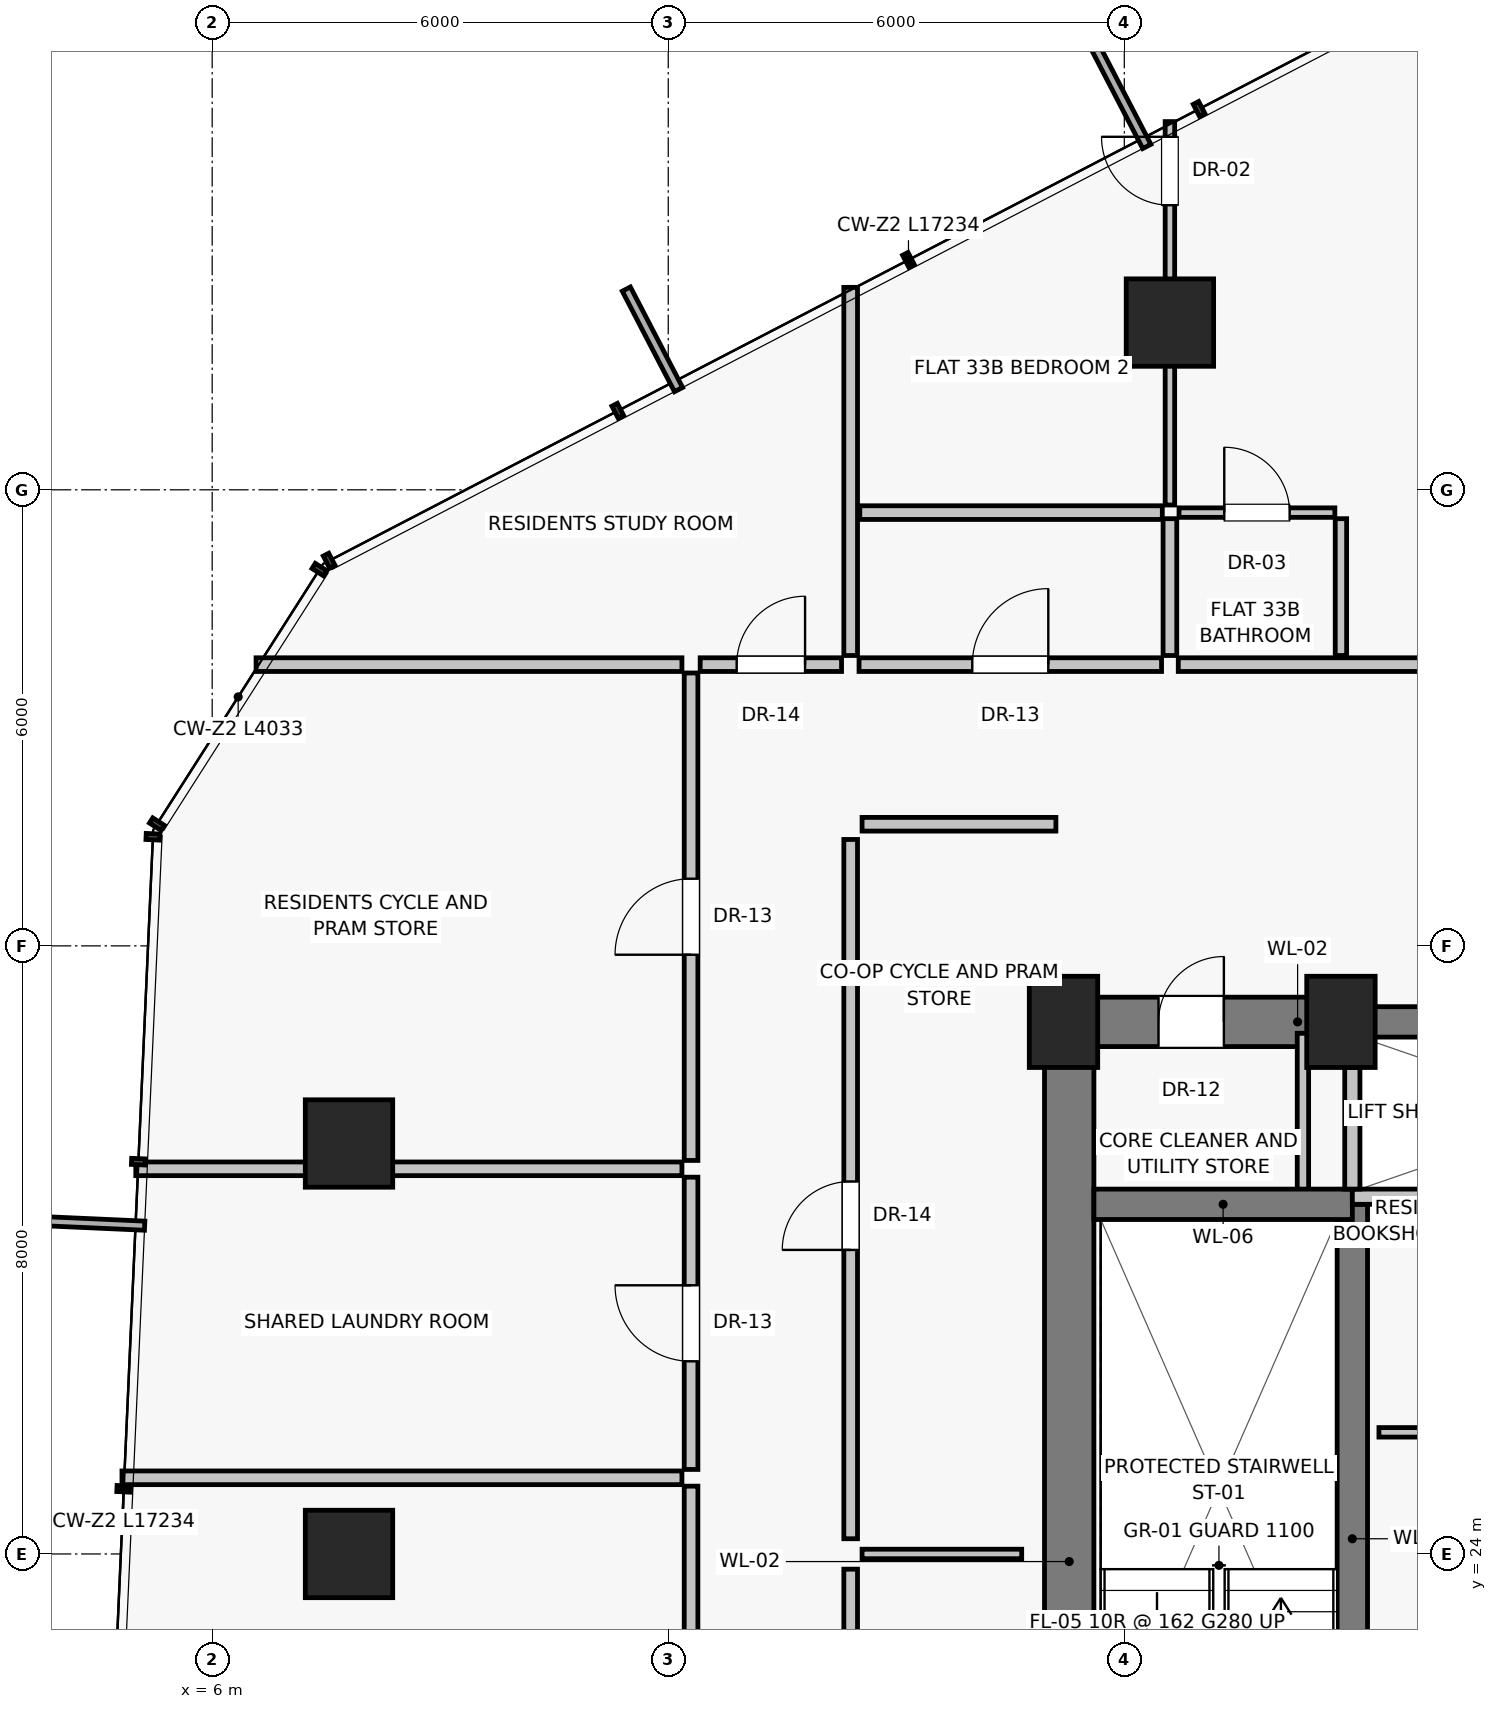
"""IFC4 building model, lengths in metres.
Left out: names, types, materials, properties, quantities, classifications, styles, units other than length and angle.
Written with IfcOpenShell. Run it as: python <this file> out.ifc"""

import sys

from ifc_helpers import new_model, si_unit, direction, frame, frame_2d, origin, origin_2d, place, context, subcontext, project, spatial, rectangle, extrude, source, transform, mapped, element, fill, save


model = new_model("IFC4")
c1 = context("Model", 3, precision=1e-05, world=origin(), true_north=direction((0.0, 1.0)))
c2 = subcontext(c1, "Body", "Model", "MODEL_VIEW")
j1 = project(units=[si_unit("LENGTHUNIT", "METRE"), si_unit("PLANEANGLEUNIT", "RADIAN")], contexts=[c1])
p1 = place(None, origin())
s1 = spatial("IfcSite", under=j1, at=p1, CompositionType="ELEMENT")
p2 = place(p1, origin())
s2 = spatial("IfcBuilding", under=s1, at=p2, CompositionType="ELEMENT")
p3 = place(p2, frame((0.0, 0.0, 119.75)))
s3 = spatial("IfcBuildingStorey", under=s2, at=p3, CompositionType="ELEMENT", Elevation=119.75)
for number, where, z_axis, x_axis in (
    (1, (17.2, 31.0, 0.0), (0.0, 0.0, 1.0), (1.0, 0.0, 0.0)),
    (2, (20.85, 31.0, 0.0), (0.0, 0.0, 1.0), (1.0, 0.0, 0.0)),
):
    element("IfcColumn", number, at=place(p3, frame(where, z_axis=z_axis, x_axis=x_axis)), inside=s3, PredefinedType="PILASTER", context=c2, shape_type="SweptSolid", body=[
        extrude(rectangle(XDim=0.9, YDim=1.2, at=origin_2d()), origin(), (0.0, 0.0, 1.0), 3.25),
    ])
for number, where, z_axis, x_axis in (
    (3, (18.6, 40.2, 0.0), (0.0, 0.0, 1.0), (1.0, 0.0, 0.0)),
    (4, (7.8, 29.4, 0.0), (0.0, 0.0, 1.0), (1.0, 0.0, 0.0)),
    (5, (7.8, 24.0, 0.0), (0.0, 0.0, 1.0), (1.0, 0.0, 0.0)),
):
    element("IfcColumn", number, at=place(p3, frame(where, z_axis=z_axis, x_axis=x_axis)), inside=s3, PredefinedType="COLUMN", context=c2, shape_type="SweptSolid", body=[
        extrude(rectangle(XDim=1.15, YDim=1.15, at=origin_2d()), origin(), (0.0, 0.0, 1.0), 3.25),
    ])
p4 = place(p3, frame((17.275, 16.8, 0.0), z_axis=(0.0, 0.0, 1.0), x_axis=(0.0, 1.0, 0.0)))
e6 = element("IfcWall", 6, at=p4, inside=s3, PredefinedType="SHEAR", context=c2, shape_type="SweptSolid", body=[
    extrude(rectangle(XDim=14.2, YDim=0.65, at=frame_2d((7.1, 0.0))), origin(), (0.0, 0.0, 1.0), 3.0),
])
p5 = place(p3, frame((17.2, 31.0, 0.0), z_axis=(0.0, 0.0, 1.0), x_axis=(1.0, 0.0, 0.0)))
e7 = element("IfcWall", 7, at=p5, inside=s3, PredefinedType="SHEAR", context=c2, shape_type="SweptSolid", body=[
    extrude(rectangle(XDim=3.8, YDim=0.65, at=frame_2d((1.9, 0.0))), origin(), (0.0, 0.0, 1.0), 3.0),
])
p6 = place(p5, frame((1.25, 0.0, 0.0)))
e8 = element("IfcOpeningElement", 8, at=p6, cuts=e7, PredefinedType="OPENING", context=c2, shape_type="SweptSolid", body=[
    extrude(rectangle(XDim=0.86, YDim=2.01, at=frame_2d((0.43, 1.005))), frame((0.0, 0.335, 0.0), z_axis=(0.0, -1.0, 0.0), x_axis=(1.0, 0.0, 0.0)), (0.0, 0.0, 1.0), 0.67),
])
p7 = place(p3, frame((21.0, 31.0, 0.0), z_axis=(0.0, 0.0, 1.0), x_axis=(1.0, 0.0, 0.0)))
e9 = element("IfcWall", 9, at=p7, inside=s3, PredefinedType="SHEAR", context=c2, shape_type="SweptSolid", body=[
    extrude(rectangle(XDim=6.0, YDim=0.4, at=frame_2d((3.0, 0.0))), origin(), (0.0, 0.0, 1.0), 3.0),
])
p8 = place(p3, frame((20.35, 28.65, 0.0), z_axis=(0.0, 0.0, 1.0), x_axis=(0.0, 1.0, 0.0)))
e10 = element("IfcWall", 10, at=p8, inside=s3, PredefinedType="PARTITIONING", context=c2, shape_type="SweptSolid", body=[
    extrude(rectangle(XDim=2.2, YDim=0.15, at=frame_2d((1.1, 0.0))), origin(), (0.0, 0.0, 1.0), 3.0),
])
p9 = place(p3, frame((21.0, 19.8, 0.0), z_axis=(0.0, 0.0, 1.0), x_axis=(0.0, 1.0, 0.0)))
e11 = element("IfcWall", 11, at=p9, inside=s3, PredefinedType="SHEAR", context=c2, shape_type="SweptSolid", body=[
    extrude(rectangle(XDim=8.8, YDim=0.4, at=frame_2d((4.4, 0.0))), origin(), (0.0, 0.0, 1.0), 3.0),
])
p10 = place(p3, frame((17.6, 28.6, 0.0), z_axis=(0.0, 0.0, 1.0), x_axis=(1.0, 0.0, 0.0)))
e12 = element("IfcWall", 12, at=p10, inside=s3, PredefinedType="SHEAR", context=c2, shape_type="SweptSolid", body=[
    extrude(rectangle(XDim=3.4, YDim=0.4, at=frame_2d((1.7, 0.0))), origin(), (0.0, 0.0, 1.0), 3.0),
])
p11 = place(p3, frame((21.0, 28.7, 0.0), z_axis=(0.0, 0.0, 1.0), x_axis=(1.0, 0.0, 0.0)))
e13 = element("IfcWall", 13, at=p11, inside=s3, PredefinedType="SOLIDWALL", context=c2, shape_type="SweptSolid", body=[
    extrude(rectangle(XDim=6.0, YDim=0.2, at=frame_2d((3.0, 0.0))), origin(), (0.0, 0.0, 1.0), 3.0),
])
p12 = place(p3, frame((21.0, 28.8, 0.0), z_axis=(0.0, 0.0, 1.0), x_axis=(0.0, 1.0, 0.0)))
e14 = element("IfcWall", 14, at=p12, inside=s3, PredefinedType="SOLIDWALL", context=c2, shape_type="SweptSolid", body=[
    extrude(rectangle(XDim=1.6, YDim=0.2, at=frame_2d((0.8, 0.0))), origin(), (0.0, 0.0, 1.0), 3.0),
])
p13 = place(p3, frame((21.35, 25.6, 0.0), z_axis=(0.0, 0.0, 1.0), x_axis=(1.0, 0.0, 0.0)))
e15 = element("IfcWall", 15, at=p13, inside=s3, PredefinedType="PARTITIONING", context=c2, shape_type="SweptSolid", body=[
    extrude(rectangle(XDim=2.4, YDim=0.125, at=frame_2d((1.2, 0.0))), origin(), (0.0, 0.0, 1.0), 3.0),
])
p14 = place(p3, frame((14.4, 14.4, 0.0), z_axis=(0.0, 0.0, 1.0), x_axis=(0.0, 1.0, 0.0)))
e16 = element("IfcWall", 16, at=p14, inside=s3, PredefinedType="PARTITIONING", context=c2, shape_type="SweptSolid", body=[
    extrude(rectangle(XDim=9.4, YDim=0.18, at=frame_2d((4.7, 0.0))), origin(), (0.0, 0.0, 1.0), 3.0),
])
p15 = place(p14, frame((3.8, 0.0, 0.0)))
e17 = element("IfcOpeningElement", 17, at=p15, cuts=e16, PredefinedType="OPENING", context=c2, shape_type="SweptSolid", body=[
    extrude(rectangle(XDim=0.9, YDim=2.01, at=frame_2d((0.45, 1.005))), frame((0.0, 0.1, 0.0), z_axis=(0.0, -1.0, 0.0), x_axis=(1.0, 0.0, 0.0)), (0.0, 0.0, 1.0), 0.2),
])
p16 = place(p3, frame((14.4, 24.2, 0.0), z_axis=(0.0, 0.0, 1.0), x_axis=(0.0, 1.0, 0.0)))
e18 = element("IfcWall", 18, at=p16, inside=s3, PredefinedType="PARTITIONING", context=c2, shape_type="SweptSolid", body=[
    extrude(rectangle(XDim=9.2, YDim=0.18, at=frame_2d((4.6, 0.0))), origin(), (0.0, 0.0, 1.0), 3.0),
])
p17 = place(p16, frame((3.8, 0.0, 0.0)))
e19 = element("IfcOpeningElement", 19, at=p17, cuts=e18, PredefinedType="OPENING", context=c2, shape_type="SweptSolid", body=[
    extrude(rectangle(XDim=0.9, YDim=2.01, at=frame_2d((0.45, 1.005))), frame((0.0, 0.1, 0.0), z_axis=(0.0, -1.0, 0.0), x_axis=(1.0, 0.0, 0.0)), (0.0, 0.0, 1.0), 0.2),
])
p18 = place(p3, frame((14.55, 24.0, 0.0), z_axis=(0.0, 0.0, 1.0), x_axis=(1.0, 0.0, 0.0)))
e20 = element("IfcWall", 20, at=p18, inside=s3, PredefinedType="PARTITIONING", context=c2, shape_type="SweptSolid", body=[
    extrude(rectangle(XDim=2.1, YDim=0.125, at=frame_2d((1.05, 0.0))), origin(), (0.0, 0.0, 1.0), 3.0),
])
p19 = place(p3, frame((14.55, 33.6, 0.0), z_axis=(0.0, 0.0, 1.0), x_axis=(1.0, 0.0, 0.0)))
e21 = element("IfcWall", 21, at=p19, inside=s3, PredefinedType="PARTITIONING", context=c2, shape_type="SweptSolid", body=[
    extrude(rectangle(XDim=2.55, YDim=0.18, at=frame_2d((1.275, 0.0))), origin(), (0.0, 0.0, 1.0), 3.0),
])
p20 = place(p3, frame((14.4, 35.82, 0.0), z_axis=(0.0, 0.0, 1.0), x_axis=(0.0, 1.0, 0.0)))
e22 = element("IfcWall", 22, at=p20, inside=s3, PredefinedType="PARTITIONING", context=c2, shape_type="SweptSolid", body=[
    extrude(rectangle(XDim=4.843, YDim=0.18, at=frame_2d((2.422, 0.0))), origin(), (0.0, 0.0, 1.0), 3.0),
])
p21 = place(p3, frame((14.51, 35.7, 0.0), z_axis=(0.0, 0.0, 1.0), x_axis=(1.0, 0.0, 0.0)))
e23 = element("IfcWall", 23, at=p21, inside=s3, PredefinedType="PARTITIONING", context=c2, shape_type="SweptSolid", body=[
    extrude(rectangle(XDim=3.98, YDim=0.18, at=frame_2d((1.99, 0.0))), origin(), (0.0, 0.0, 1.0), 2.58),
])
p22 = place(p21, frame((1.49, 0.0, 0.0)))
e24 = element("IfcOpeningElement", 24, at=p22, cuts=e23, PredefinedType="OPENING", context=c2, shape_type="SweptSolid", body=[
    extrude(rectangle(XDim=1.0, YDim=2.01, at=frame_2d((0.5, 1.005))), frame((0.0, 0.1, 0.0), z_axis=(0.0, -1.0, 0.0), x_axis=(1.0, 0.0, 0.0)), (0.0, 0.0, 1.0), 0.2),
])
p23 = place(p3, frame((18.71, 35.7, 0.0), z_axis=(0.0, 0.0, 1.0), x_axis=(1.0, 0.0, 0.0)))
e25 = element("IfcWall", 25, at=p23, inside=s3, PredefinedType="PARTITIONING", context=c2, shape_type="SweptSolid", body=[
    extrude(rectangle(XDim=14.78, YDim=0.18, at=frame_2d((7.39, 0.0))), origin(), (0.0, 0.0, 1.0), 2.58),
])
p24 = place(p23, frame((5.94, 0.0, 0.0)))
e26 = element("IfcOpeningElement", 26, at=p24, cuts=e25, PredefinedType="OPENING", context=c2, shape_type="SweptSolid", body=[
    extrude(rectangle(XDim=0.95, YDim=2.02, at=frame_2d((0.475, 1.01))), frame((0.0, 0.1, 0.0), z_axis=(0.0, -1.0, 0.0), x_axis=(1.0, 0.0, 0.0)), (0.0, 0.0, 1.0), 0.2),
])
p25 = place(p3, frame((14.52, 37.7, 0.0), z_axis=(0.0, 0.0, 1.0), x_axis=(1.0, 0.0, 0.0)))
e27 = element("IfcWall", 27, at=p25, inside=s3, PredefinedType="PARTITIONING", context=c2, shape_type="SweptSolid", body=[
    extrude(rectangle(XDim=3.98, YDim=0.18, at=frame_2d((1.99, 0.0))), origin(), (0.0, 0.0, 1.0), 3.0),
])
p26 = place(p3, frame((18.6, 35.82, 0.0), z_axis=(0.0, 0.0, 1.0), x_axis=(0.0, 1.0, 0.0)))
e28 = element("IfcWall", 28, at=p26, inside=s3, PredefinedType="PARTITIONING", context=c2, shape_type="SweptSolid", body=[
    extrude(rectangle(XDim=1.8, YDim=0.18, at=frame_2d((0.9, 0.0))), origin(), (0.0, 0.0, 1.0), 2.378),
])
p27 = place(p3, frame((18.6, 37.8, 0.0), z_axis=(0.0, 0.0, 1.0), x_axis=(0.0, 1.0, 0.0)))
e29 = element("IfcWall", 29, at=p27, inside=s3, PredefinedType="PARTITIONING", context=c2, shape_type="SweptSolid", body=[
    extrude(rectangle(XDim=5.044, YDim=0.125, at=frame_2d((2.522, 0.0))), origin(), (0.0, 0.0, 1.0), 2.378),
])
p28 = place(p27, frame((3.944, 0.0, 0.0)))
e30 = element("IfcOpeningElement", 30, at=p28, cuts=e29, PredefinedType="OPENING", context=c2, shape_type="SweptSolid", body=[
    extrude(rectangle(XDim=0.9, YDim=2.01, at=frame_2d((0.45, 1.005))), frame((0.0, 0.073, 0.0), z_axis=(0.0, -1.0, 0.0), x_axis=(1.0, 0.0, 0.0)), (0.0, 0.0, 1.0), 0.145),
])
p29 = place(p3, frame((20.85, 35.82, 0.0), z_axis=(0.0, 0.0, 1.0), x_axis=(0.0, 1.0, 0.0)))
e31 = element("IfcWall", 31, at=p29, inside=s3, PredefinedType="PARTITIONING", context=c2, shape_type="SweptSolid", body=[
    extrude(rectangle(XDim=1.8, YDim=0.15, at=frame_2d((0.9, 0.0))), origin(), (0.0, 0.0, 1.0), 3.0),
])
p30 = place(p3, frame((18.72, 37.7, 0.0), z_axis=(0.0, 0.0, 1.0), x_axis=(1.0, 0.0, 0.0)))
e32 = element("IfcWall", 32, at=p30, inside=s3, PredefinedType="PARTITIONING", context=c2, shape_type="SweptSolid", body=[
    extrude(rectangle(XDim=2.05, YDim=0.125, at=frame_2d((1.025, 0.0))), origin(), (0.0, 0.0, 1.0), 3.0),
])
p31 = place(p30, frame((0.595, 0.0, 0.0)))
e33 = element("IfcOpeningElement", 33, at=p31, cuts=e32, PredefinedType="OPENING", context=c2, shape_type="SweptSolid", body=[
    extrude(rectangle(XDim=0.86, YDim=2.01, at=frame_2d((0.43, 1.005))), frame((0.0, 0.073, 0.0), z_axis=(0.0, -1.0, 0.0), x_axis=(1.0, 0.0, 0.0)), (0.0, 0.0, 1.0), 0.145),
])
p32 = place(p3, frame((12.18, 35.7, 0.0), z_axis=(0.0, 0.0, 1.0), x_axis=(-1.0, 0.0, 0.0)))
e34 = element("IfcWall", 34, at=p32, inside=s3, PredefinedType="PARTITIONING", context=c2, shape_type="SweptSolid", body=[
    extrude(rectangle(XDim=5.603, YDim=0.18, at=frame_2d((2.801, 0.0))), origin(), (0.0, 0.0, 1.0), 3.0),
])
p33 = place(p3, frame((12.3, 17.113, 0.0), z_axis=(0.0, 0.0, 1.0), x_axis=(0.0, 1.0, 0.0)))
e35 = element("IfcWall", 35, at=p33, inside=s3, PredefinedType="PARTITIONING", context=c2, shape_type="SweptSolid", body=[
    extrude(rectangle(XDim=7.779, YDim=0.18, at=frame_2d((3.89, 0.0))), origin(), (0.0, 0.0, 1.0), 2.58),
])
p34 = place(p33, frame((3.389, 0.0, 0.0)))
e36 = element("IfcOpeningElement", 36, at=p34, cuts=e35, PredefinedType="OPENING", context=c2, shape_type="SweptSolid", body=[
    extrude(rectangle(XDim=1.0, YDim=2.01, at=frame_2d((0.5, 1.005))), frame((0.0, 0.1, 0.0), z_axis=(0.0, -1.0, 0.0), x_axis=(1.0, 0.0, 0.0)), (0.0, 0.0, 1.0), 0.2),
])
p35 = place(p3, frame((12.18, 25.002, 0.0), z_axis=(0.0, 0.0, 1.0), x_axis=(-1.0, 0.0, 0.0)))
e37 = element("IfcWall", 37, at=p35, inside=s3, PredefinedType="PARTITIONING", context=c2, shape_type="SweptSolid", body=[
    extrude(rectangle(XDim=7.367, YDim=0.18, at=frame_2d((3.683, 0.0))), origin(), (0.0, 0.0, 1.0), 3.0),
])
p36 = place(p3, frame((12.3, 25.112, 0.0), z_axis=(0.0, 0.0, 1.0), x_axis=(0.0, 1.0, 0.0)))
e38 = element("IfcWall", 38, at=p36, inside=s3, PredefinedType="PARTITIONING", context=c2, shape_type="SweptSolid", body=[
    extrude(rectangle(XDim=3.845, YDim=0.18, at=frame_2d((1.922, 0.0))), origin(), (0.0, 0.0, 1.0), 2.58),
])
p37 = place(p36, frame((1.423, 0.0, 0.0)))
e39 = element("IfcOpeningElement", 39, at=p37, cuts=e38, PredefinedType="OPENING", context=c2, shape_type="SweptSolid", body=[
    extrude(rectangle(XDim=1.0, YDim=2.01, at=frame_2d((0.5, 1.005))), frame((0.0, 0.1, 0.0), z_axis=(0.0, -1.0, 0.0), x_axis=(1.0, 0.0, 0.0)), (0.0, 0.0, 1.0), 0.2),
])
p38 = place(p3, frame((12.3, 29.177, 0.0), z_axis=(0.0, 0.0, 1.0), x_axis=(0.0, 1.0, 0.0)))
e40 = element("IfcWall", 40, at=p38, inside=s3, PredefinedType="PARTITIONING", context=c2, shape_type="SweptSolid", body=[
    extrude(rectangle(XDim=6.413, YDim=0.18, at=frame_2d((3.207, 0.0))), origin(), (0.0, 0.0, 1.0), 2.58),
])
p39 = place(p38, frame((2.707, 0.0, 0.0)))
e41 = element("IfcOpeningElement", 41, at=p39, cuts=e40, PredefinedType="OPENING", context=c2, shape_type="SweptSolid", body=[
    extrude(rectangle(XDim=1.0, YDim=2.01, at=frame_2d((0.5, 1.005))), frame((0.0, 0.1, 0.0), z_axis=(0.0, -1.0, 0.0), x_axis=(1.0, 0.0, 0.0)), (0.0, 0.0, 1.0), 0.2),
])
p40 = place(p3, frame((12.18, 29.067, 0.0), z_axis=(0.0, 0.0, 1.0), x_axis=(-1.0, 0.0, 0.0)))
e42 = element("IfcWall", 42, at=p40, inside=s3, PredefinedType="PARTITIONING", context=c2, shape_type="SweptSolid", body=[
    extrude(rectangle(XDim=7.185, YDim=0.18, at=frame_2d((3.593, 0.0))), origin(), (0.0, 0.0, 1.0), 2.378),
])
p41 = place(p3, frame((12.42, 35.7, 0.0), z_axis=(0.0, 0.0, 1.0), x_axis=(1.0, 0.0, 0.0)))
e43 = element("IfcWall", 43, at=p41, inside=s3, PredefinedType="PARTITIONING", context=c2, shape_type="SweptSolid", body=[
    extrude(rectangle(XDim=1.86, YDim=0.18, at=frame_2d((0.93, 0.0))), origin(), (0.0, 0.0, 1.0), 3.0),
])
p42 = place(p41, frame((0.48, 0.0, 0.0)))
e44 = element("IfcOpeningElement", 44, at=p42, cuts=e43, PredefinedType="OPENING", context=c2, shape_type="SweptSolid", body=[
    extrude(rectangle(XDim=0.9, YDim=2.01, at=frame_2d((0.45, 1.005))), frame((0.0, 0.1, 0.0), z_axis=(0.0, -1.0, 0.0), x_axis=(1.0, 0.0, 0.0)), (0.0, 0.0, 1.0), 0.2),
])
m1 = source(origin(), c2, "Body", "SweptSolid", [
    extrude(rectangle(XDim=0.86, YDim=2.01, at=frame_2d((0.43, 1.005))), frame((0.0, 0.025, 0.0), z_axis=(0.0, -1.0, 0.0), x_axis=(1.0, 0.0, 0.0)), (0.0, 0.0, 1.0), 0.05),
])
p43 = place(p6, origin())
e45 = element("IfcDoor", 45, at=p43, inside=s3, OperationType="SINGLE_SWING_RIGHT", PredefinedType="DOOR", context=c2, shape_type="MappedRepresentation", body=[
    mapped(m1, transform((0.0, 0.0, 0.0), scale=1.0)),
])
fill(e8, e45)
m2 = source(origin(), c2, "Body", "SweptSolid", [
    extrude(rectangle(XDim=0.9, YDim=2.01, at=frame_2d((0.45, 1.005))), frame((0.0, 0.025, 0.0), z_axis=(0.0, -1.0, 0.0), x_axis=(1.0, 0.0, 0.0)), (0.0, 0.0, 1.0), 0.05),
])
p44 = place(p17, origin())
e46 = element("IfcDoor", 46, at=p44, inside=s3, OperationType="SINGLE_SWING_LEFT", PredefinedType="DOOR", context=c2, shape_type="MappedRepresentation", body=[
    mapped(m2, transform((0.0, 0.0, 0.0), scale=1.0)),
])
fill(e19, e46)
m3 = source(origin(), c2, "Body", "SweptSolid", [
    extrude(rectangle(XDim=1.0, YDim=2.01, at=frame_2d((0.5, 1.005))), frame((0.0, 0.025, 0.0), z_axis=(0.0, -1.0, 0.0), x_axis=(1.0, 0.0, 0.0)), (0.0, 0.0, 1.0), 0.05),
])
p45 = place(p22, origin())
e47 = element("IfcDoor", 47, at=p45, inside=s3, OperationType="SINGLE_SWING_RIGHT", PredefinedType="DOOR", context=c2, shape_type="MappedRepresentation", body=[
    mapped(m3, transform((0.0, 0.0, 0.0), scale=1.0)),
])
fill(e24, e47)
p46 = place(p28, origin())
e48 = element("IfcDoor", 48, at=p46, inside=s3, OperationType="SINGLE_SWING_RIGHT", PredefinedType="DOOR", context=c2, shape_type="MappedRepresentation", body=[
    mapped(m2, transform((0.0, 0.0, 0.0), scale=1.0)),
])
fill(e30, e48)
p47 = place(p31, origin())
e49 = element("IfcDoor", 49, at=p47, inside=s3, OperationType="SINGLE_SWING_LEFT", PredefinedType="DOOR", context=c2, shape_type="MappedRepresentation", body=[
    mapped(m1, transform((0.0, 0.0, 0.0), scale=1.0)),
])
fill(e33, e49)
p48 = place(p37, origin())
e50 = element("IfcDoor", 50, at=p48, inside=s3, OperationType="SINGLE_SWING_RIGHT", PredefinedType="DOOR", context=c2, shape_type="MappedRepresentation", body=[
    mapped(m3, transform((0.0, 0.0, 0.0), scale=1.0)),
])
fill(e39, e50)
p49 = place(p39, origin())
e51 = element("IfcDoor", 51, at=p49, inside=s3, OperationType="SINGLE_SWING_LEFT", PredefinedType="DOOR", context=c2, shape_type="MappedRepresentation", body=[
    mapped(m3, transform((0.0, 0.0, 0.0), scale=1.0)),
])
fill(e41, e51)
p50 = place(p42, origin())
e52 = element("IfcDoor", 52, at=p50, inside=s3, OperationType="SINGLE_SWING_RIGHT", PredefinedType="DOOR", context=c2, shape_type="MappedRepresentation", body=[
    mapped(m2, transform((0.0, 0.0, 0.0), scale=1.0)),
])
fill(e44, e52)
save(model, sys.argv[1])
